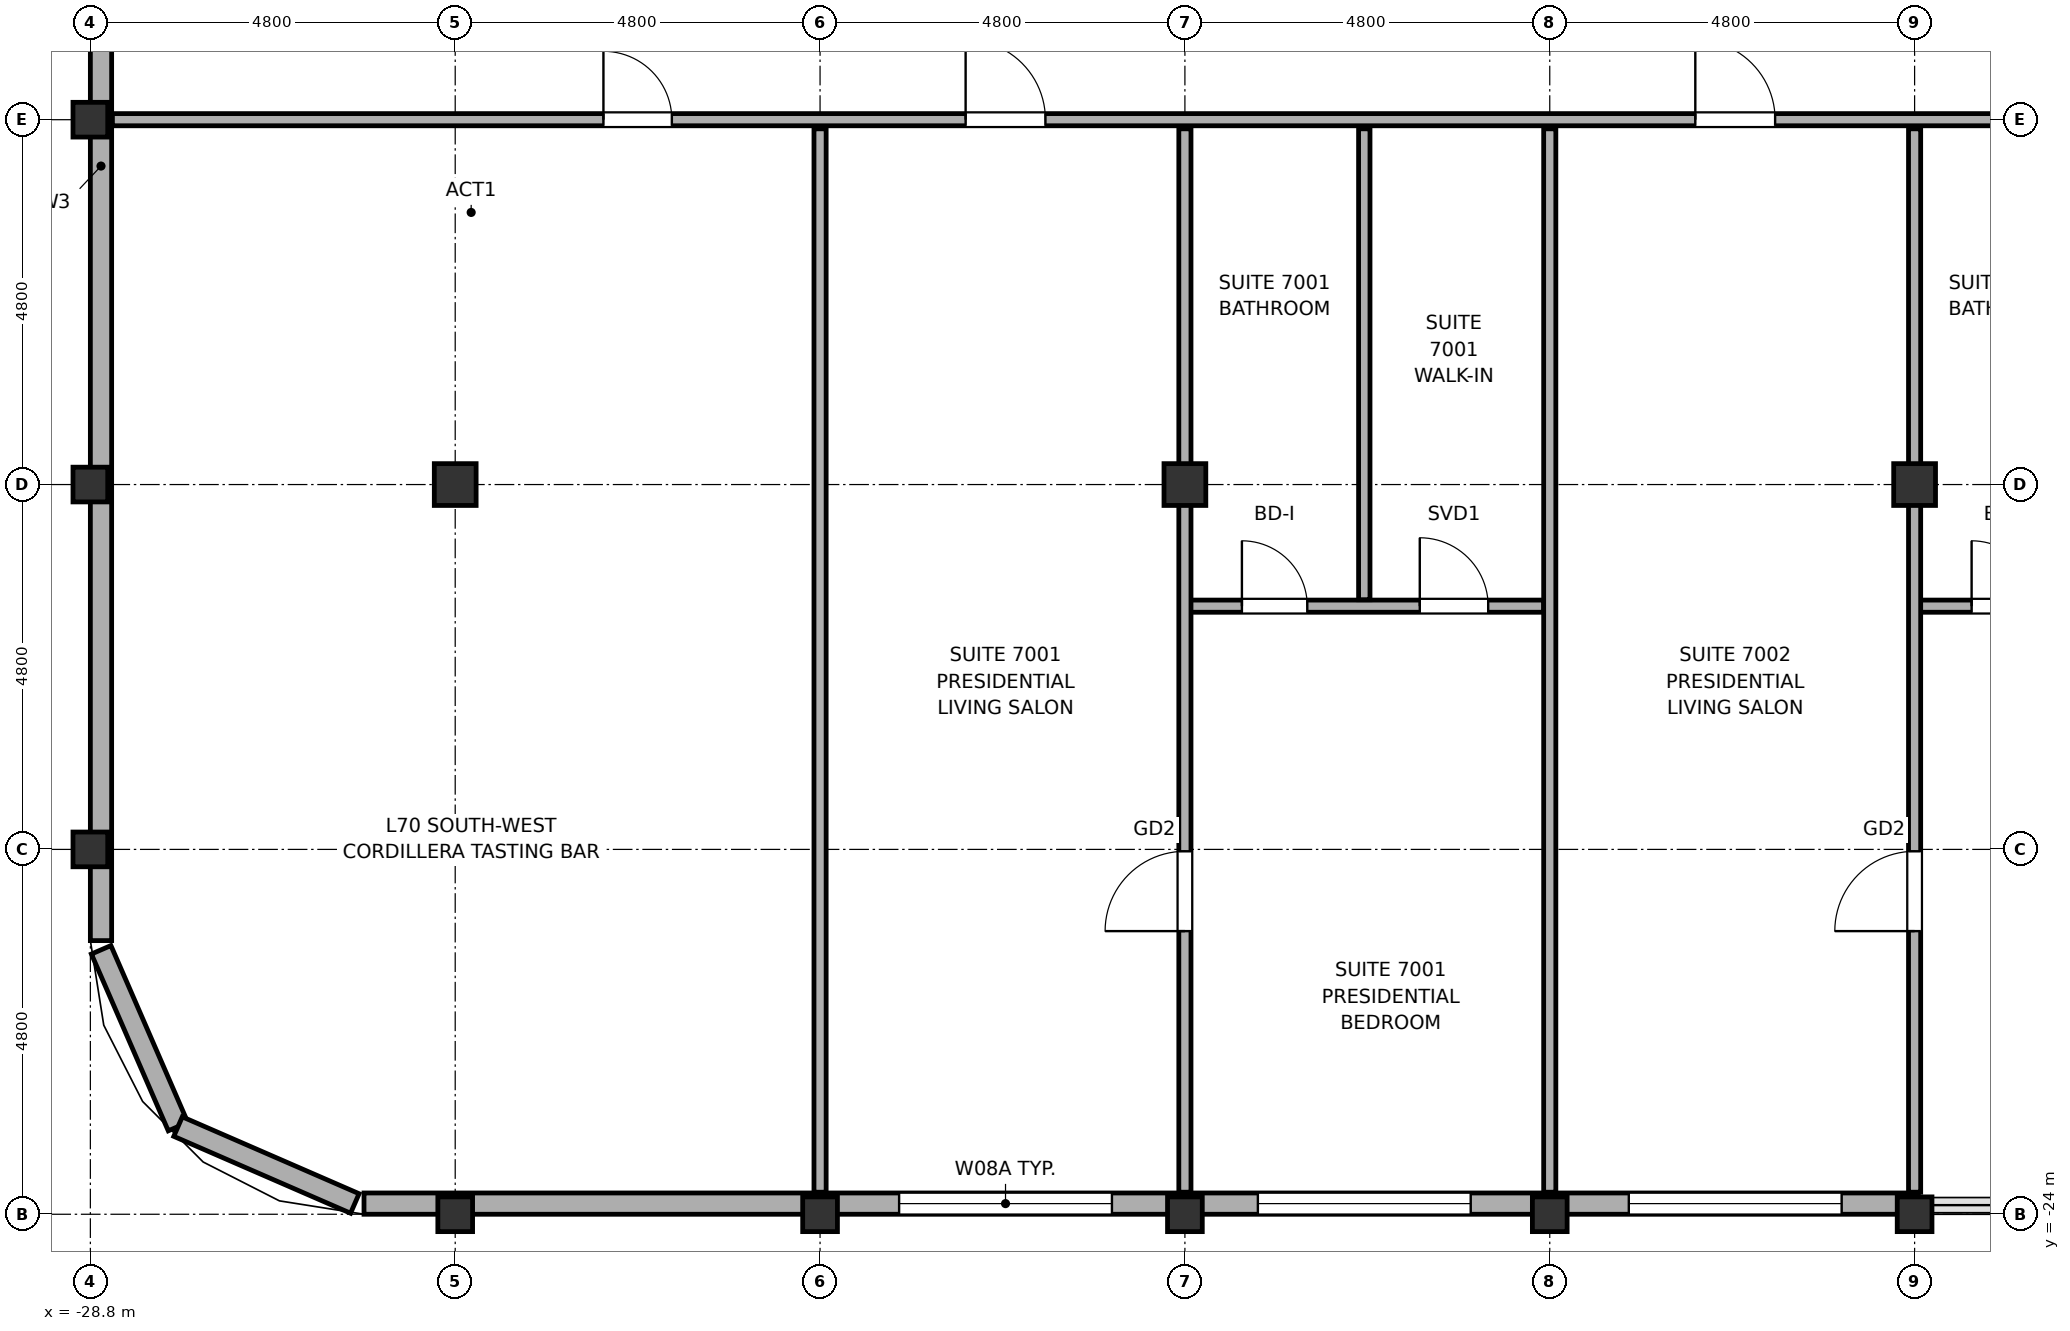
"""IFC4 building model, lengths in metres.
Left out: names, types, materials, properties, quantities, classifications, styles, units other than length and angle.
Written with IfcOpenShell. Run it as: python <this file> out.ifc"""

import sys

from ifc_helpers import new_model, si_unit, direction, frame, frame_2d, origin, origin_2d, place, context, subcontext, project, spatial, rectangle, hollow_rectangle, hollow_circle, extrude, element, fill, save


model = new_model("IFC4")
c1 = context("Model", 3, precision=1e-05, world=origin(), true_north=direction((0.0, 1.0)))
c2 = subcontext(c1, "Body", "Model", "MODEL_VIEW")
j1 = project(units=[si_unit("LENGTHUNIT", "METRE"), si_unit("PLANEANGLEUNIT", "RADIAN")], contexts=[c1])
p1 = place(None, origin())
s1 = spatial("IfcSite", under=j1, at=p1, CompositionType="ELEMENT")
p2 = place(p1, origin())
s2 = spatial("IfcBuilding", under=s1, at=p2, CompositionType="ELEMENT")
p3 = place(p2, frame((0.0, 0.0, 282.2)))
s3 = spatial("IfcBuildingStorey", under=s2, at=p3, CompositionType="ELEMENT", Elevation=282.2)
for number, where, z_axis, x_axis in (
    (1, (-28.8, -19.2, 0.0), (0.0, 0.0, 1.0), (1.0, 0.0, 0.0)),
    (2, (-28.8, -14.4, 0.0), (0.0, 0.0, 1.0), (1.0, 0.0, 0.0)),
    (3, (-28.8, -9.6, 0.0), (0.0, 0.0, 1.0), (1.0, 0.0, 0.0)),
):
    element("IfcColumn", number, at=place(p3, frame(where, z_axis=z_axis, x_axis=x_axis)), inside=s3, PredefinedType="COLUMN", context=c2, shape_type="SweptSolid", body=[
        extrude(hollow_circle(Radius=0.229, WallThickness=0.02, at=origin_2d()), origin(), (0.0, 0.0, 1.0), 4.2),
    ])
p4 = place(p3, frame((-24.0, -24.0, -0.2), z_axis=(0.0, 0.0, 1.0), x_axis=(1.0, 0.0, 0.0)))
e4 = element("IfcColumn", 4, at=p4, inside=s3, PredefinedType="COLUMN", context=c2, shape_type="SweptSolid", body=[
    extrude(hollow_circle(Radius=0.229, WallThickness=0.02, at=origin_2d()), origin(), (0.0, 0.0, 1.0), 4.4),
])
p5 = place(p3, frame((-24.0, -14.4, 0.0), z_axis=(0.0, 0.0, 1.0), x_axis=(1.0, 0.0, 0.0)))
e5 = element("IfcColumn", 5, at=p5, inside=s3, PredefinedType="COLUMN", context=c2, shape_type="SweptSolid", body=[
    extrude(hollow_rectangle(XDim=0.55, YDim=0.55, WallThickness=0.025, at=origin_2d()), origin(), (0.0, 0.0, 1.0), 4.2),
])
for number, where, z_axis, x_axis in (
    (6, (-19.2, -24.0, -0.2), (0.0, 0.0, 1.0), (1.0, 0.0, 0.0)),
    (7, (-14.4, -24.0, -0.2), (0.0, 0.0, 1.0), (1.0, 0.0, 0.0)),
):
    element("IfcColumn", number, at=place(p3, frame(where, z_axis=z_axis, x_axis=x_axis)), inside=s3, PredefinedType="COLUMN", context=c2, shape_type="SweptSolid", body=[
        extrude(hollow_circle(Radius=0.229, WallThickness=0.02, at=origin_2d()), origin(), (0.0, 0.0, 1.0), 4.4),
    ])
p6 = place(p3, frame((-14.4, -14.4, 0.0), z_axis=(0.0, 0.0, 1.0), x_axis=(1.0, 0.0, 0.0)))
e8 = element("IfcColumn", 8, at=p6, inside=s3, PredefinedType="COLUMN", context=c2, shape_type="SweptSolid", body=[
    extrude(hollow_rectangle(XDim=0.55, YDim=0.55, WallThickness=0.025, at=origin_2d()), origin(), (0.0, 0.0, 1.0), 4.2),
])
for number, where, z_axis, x_axis in (
    (9, (-9.6, -24.0, -0.2), (0.0, 0.0, 1.0), (1.0, 0.0, 0.0)),
    (10, (-4.8, -24.0, -0.2), (0.0, 0.0, 1.0), (1.0, 0.0, 0.0)),
):
    element("IfcColumn", number, at=place(p3, frame(where, z_axis=z_axis, x_axis=x_axis)), inside=s3, PredefinedType="COLUMN", context=c2, shape_type="SweptSolid", body=[
        extrude(hollow_circle(Radius=0.229, WallThickness=0.02, at=origin_2d()), origin(), (0.0, 0.0, 1.0), 4.4),
    ])
p7 = place(p3, frame((-4.8, -14.4, 0.0), z_axis=(0.0, 0.0, 1.0), x_axis=(1.0, 0.0, 0.0)))
e11 = element("IfcColumn", 11, at=p7, inside=s3, PredefinedType="COLUMN", context=c2, shape_type="SweptSolid", body=[
    extrude(hollow_rectangle(XDim=0.55, YDim=0.55, WallThickness=0.025, at=origin_2d()), origin(), (0.0, 0.0, 1.0), 4.2),
])
p8 = place(p3, frame((-28.658, -20.521, 0.0), z_axis=(0.0, 0.0, 1.0), x_axis=(0.398792985289, -0.917040977756, 0.0)))
e12 = element("IfcWall", 12, at=p8, inside=s3, PredefinedType="SOLIDWALL", context=c2, shape_type="SweptSolid", body=[
    extrude(rectangle(XDim=2.536, YDim=0.28, at=frame_2d((1.268, 0.0))), origin(), (0.0, 0.0, 1.0), 2.6),
])
p9 = place(p3, frame((-27.646, -22.847, 0.0), z_axis=(0.0, 0.0, 1.0), x_axis=(0.917060872934, -0.398747232384, 0.0)))
e13 = element("IfcWall", 13, at=p9, inside=s3, PredefinedType="SOLIDWALL", context=c2, shape_type="SweptSolid", body=[
    extrude(rectangle(XDim=2.536, YDim=0.28, at=frame_2d((1.268, 0.0))), origin(), (0.0, 0.0, 1.0), 2.6),
])
p10 = place(p3, frame((-25.2, -23.86, 0.0), z_axis=(0.0, 0.0, 1.0), x_axis=(1.0, 0.0, 0.0)))
e14 = element("IfcWall", 14, at=p10, inside=s3, PredefinedType="SOLIDWALL", context=c2, shape_type="SweptSolid", body=[
    extrude(rectangle(XDim=20.45, YDim=0.28, at=frame_2d((10.225, 0.0))), origin(), (0.0, 0.0, 1.0), 2.6),
])
p11 = place(p10, frame((7.04, 0.0, 0.75)))
e15 = element("IfcOpeningElement", 15, at=p11, cuts=e14, PredefinedType="OPENING", context=c2, shape_type="SweptSolid", body=[
    extrude(rectangle(XDim=2.8, YDim=1.7, at=frame_2d((1.4, 0.85))), frame((0.0, 0.155, 0.0), z_axis=(0.0, -1.0, 0.0), x_axis=(1.0, 0.0, 0.0)), (0.0, 0.0, 1.0), 0.31),
])
p12 = place(p10, frame((11.76, 0.0, 0.75)))
e16 = element("IfcOpeningElement", 16, at=p12, cuts=e14, PredefinedType="OPENING", context=c2, shape_type="SweptSolid", body=[
    extrude(rectangle(XDim=2.8, YDim=1.7, at=frame_2d((1.4, 0.85))), frame((0.0, 0.155, 0.0), z_axis=(0.0, -1.0, 0.0), x_axis=(1.0, 0.0, 0.0)), (0.0, 0.0, 1.0), 0.31),
])
p13 = place(p10, frame((16.64, 0.0, 0.75)))
e17 = element("IfcOpeningElement", 17, at=p13, cuts=e14, PredefinedType="OPENING", context=c2, shape_type="SweptSolid", body=[
    extrude(rectangle(XDim=2.8, YDim=1.7, at=frame_2d((1.4, 0.85))), frame((0.0, 0.155, 0.0), z_axis=(0.0, -1.0, 0.0), x_axis=(1.0, 0.0, 0.0)), (0.0, 0.0, 1.0), 0.31),
])
p14 = place(p3, frame((-28.66, -20.4, 0.0), z_axis=(0.0, 0.0, 1.0), x_axis=(0.0, 1.0, 0.0)))
e18 = element("IfcWall", 18, at=p14, inside=s3, PredefinedType="SOLIDWALL", context=c2, shape_type="SweptSolid", body=[
    extrude(rectangle(XDim=20.38, YDim=0.28, at=frame_2d((10.19, 0.0))), origin(), (0.0, 0.0, 1.0), 2.6),
])
p15 = place(p3, frame((-14.4, -16.0, 0.0), z_axis=(0.0, 0.0, 1.0), x_axis=(1.0, 0.0, 0.0)))
e19 = element("IfcWall", 19, at=p15, inside=s3, PredefinedType="PARTITIONING", context=c2, shape_type="SweptSolid", body=[
    extrude(rectangle(XDim=4.72, YDim=0.16, at=frame_2d((2.36, 0.0))), origin(), (0.0, 0.0, 1.0), 3.56),
])
p16 = place(p15, frame((0.75, 0.0, 0.0)))
e20 = element("IfcOpeningElement", 20, at=p16, cuts=e19, PredefinedType="OPENING", context=c2, shape_type="SweptSolid", body=[
    extrude(rectangle(XDim=0.86, YDim=2.1, at=frame_2d((0.43, 1.05))), frame((0.0, 0.095, 0.0), z_axis=(0.0, -1.0, 0.0), x_axis=(1.0, 0.0, 0.0)), (0.0, 0.0, 1.0), 0.19),
])
p17 = place(p15, frame((3.09, 0.0, 0.0)))
e21 = element("IfcOpeningElement", 21, at=p17, cuts=e19, PredefinedType="OPENING", context=c2, shape_type="SweptSolid", body=[
    extrude(rectangle(XDim=0.9, YDim=2.1, at=frame_2d((0.45, 1.05))), frame((0.0, 0.095, 0.0), z_axis=(0.0, -1.0, 0.0), x_axis=(1.0, 0.0, 0.0)), (0.0, 0.0, 1.0), 0.19),
])
p18 = place(p3, frame((-4.8, -16.0, 0.0), z_axis=(0.0, 0.0, 1.0), x_axis=(1.0, 0.0, 0.0)))
e22 = element("IfcWall", 22, at=p18, inside=s3, PredefinedType="PARTITIONING", context=c2, shape_type="SweptSolid", body=[
    extrude(rectangle(XDim=4.72, YDim=0.16, at=frame_2d((2.36, 0.0))), origin(), (0.0, 0.0, 1.0), 3.56),
])
p19 = place(p18, frame((0.75, 0.0, 0.0)))
e23 = element("IfcOpeningElement", 23, at=p19, cuts=e22, PredefinedType="OPENING", context=c2, shape_type="SweptSolid", body=[
    extrude(rectangle(XDim=0.86, YDim=2.1, at=frame_2d((0.43, 1.05))), frame((0.0, 0.095, 0.0), z_axis=(0.0, -1.0, 0.0), x_axis=(1.0, 0.0, 0.0)), (0.0, 0.0, 1.0), 0.19),
])
p20 = place(p18, frame((3.09, 0.0, 0.0)))
e24 = element("IfcOpeningElement", 24, at=p20, cuts=e22, PredefinedType="OPENING", context=c2, shape_type="SweptSolid", body=[
    extrude(rectangle(XDim=0.9, YDim=2.1, at=frame_2d((0.45, 1.05))), frame((0.0, 0.095, 0.0), z_axis=(0.0, -1.0, 0.0), x_axis=(1.0, 0.0, 0.0)), (0.0, 0.0, 1.0), 0.19),
])
p21 = place(p3, frame((-28.51, -9.6, 0.0), z_axis=(0.0, 0.0, 1.0), x_axis=(1.0, 0.0, 0.0)))
e25 = element("IfcWall", 25, at=p21, inside=s3, PredefinedType="PARTITIONING", context=c2, shape_type="SweptSolid", body=[
    extrude(rectangle(XDim=52.22, YDim=0.16, at=frame_2d((26.11, 0.0))), origin(), (0.0, 0.0, 1.0), 3.56),
])
p22 = place(p21, frame((6.46, 0.0, 0.0)))
e26 = element("IfcOpeningElement", 26, at=p22, cuts=e25, PredefinedType="OPENING", context=c2, shape_type="SweptSolid", body=[
    extrude(rectangle(XDim=0.9, YDim=2.1, at=frame_2d((0.45, 1.05))), frame((0.0, 0.095, 0.0), z_axis=(0.0, -1.0, 0.0), x_axis=(1.0, 0.0, 0.0)), (0.0, 0.0, 1.0), 0.19),
])
p23 = place(p21, frame((44.86, 0.0, 0.0)))
e27 = element("IfcOpeningElement", 27, at=p23, cuts=e25, PredefinedType="OPENING", context=c2, shape_type="SweptSolid", body=[
    extrude(rectangle(XDim=0.9, YDim=2.1, at=frame_2d((0.45, 1.05))), frame((0.0, 0.095, 0.0), z_axis=(0.0, -1.0, 0.0), x_axis=(1.0, 0.0, 0.0)), (0.0, 0.0, 1.0), 0.19),
])
p24 = place(p21, frame((11.225, 0.0, 0.0)))
e28 = element("IfcOpeningElement", 28, at=p24, cuts=e25, PredefinedType="OPENING", context=c2, shape_type="SweptSolid", body=[
    extrude(rectangle(XDim=1.05, YDim=2.2, at=frame_2d((0.525, 1.1))), frame((0.0, 0.095, 0.0), z_axis=(0.0, -1.0, 0.0), x_axis=(1.0, 0.0, 0.0)), (0.0, 0.0, 1.0), 0.19),
])
p25 = place(p21, frame((20.825, 0.0, 0.0)))
e29 = element("IfcOpeningElement", 29, at=p25, cuts=e25, PredefinedType="OPENING", context=c2, shape_type="SweptSolid", body=[
    extrude(rectangle(XDim=1.05, YDim=2.2, at=frame_2d((0.525, 1.1))), frame((0.0, 0.095, 0.0), z_axis=(0.0, -1.0, 0.0), x_axis=(1.0, 0.0, 0.0)), (0.0, 0.0, 1.0), 0.19),
])
p26 = place(p21, frame((30.425, 0.0, 0.0)))
e30 = element("IfcOpeningElement", 30, at=p26, cuts=e25, PredefinedType="OPENING", context=c2, shape_type="SweptSolid", body=[
    extrude(rectangle(XDim=1.05, YDim=2.2, at=frame_2d((0.525, 1.1))), frame((0.0, 0.095, 0.0), z_axis=(0.0, -1.0, 0.0), x_axis=(1.0, 0.0, 0.0)), (0.0, 0.0, 1.0), 0.19),
])
p27 = place(p21, frame((41.115, 0.0, 0.0)))
e31 = element("IfcOpeningElement", 31, at=p27, cuts=e25, PredefinedType="OPENING", context=c2, shape_type="SweptSolid", body=[
    extrude(rectangle(XDim=0.92, YDim=2.15, at=frame_2d((0.46, 1.075))), frame((0.0, 0.095, 0.0), z_axis=(0.0, -1.0, 0.0), x_axis=(1.0, 0.0, 0.0)), (0.0, 0.0, 1.0), 0.19),
])
p28 = place(p3, frame((-19.2, -23.71, 0.0), z_axis=(0.0, 0.0, 1.0), x_axis=(0.0, 1.0, 0.0)))
e32 = element("IfcWall", 32, at=p28, inside=s3, PredefinedType="PARTITIONING", context=c2, shape_type="SweptSolid", body=[
    extrude(rectangle(XDim=13.99, YDim=0.16, at=frame_2d((6.995, 0.0))), origin(), (0.0, 0.0, 1.0), 2.6),
])
p29 = place(p3, frame((-14.4, -23.71, 0.0), z_axis=(0.0, 0.0, 1.0), x_axis=(0.0, 1.0, 0.0)))
e33 = element("IfcWall", 33, at=p29, inside=s3, PredefinedType="PARTITIONING", context=c2, shape_type="SweptSolid", body=[
    extrude(rectangle(XDim=13.99, YDim=0.16, at=frame_2d((6.995, 0.0))), origin(), (0.0, 0.0, 1.0), 2.6),
])
p30 = place(p29, frame((3.435, 0.0, 0.0)))
e34 = element("IfcOpeningElement", 34, at=p30, cuts=e33, PredefinedType="OPENING", context=c2, shape_type="SweptSolid", body=[
    extrude(rectangle(XDim=1.05, YDim=2.2, at=frame_2d((0.525, 1.1))), frame((0.0, 0.095, 0.0), z_axis=(0.0, -1.0, 0.0), x_axis=(1.0, 0.0, 0.0)), (0.0, 0.0, 1.0), 0.19),
])
p31 = place(p3, frame((-12.04, -15.915, 0.0), z_axis=(0.0, 0.0, 1.0), x_axis=(0.0, 1.0, 0.0)))
e35 = element("IfcWall", 35, at=p31, inside=s3, PredefinedType="PARTITIONING", context=c2, shape_type="SweptSolid", body=[
    extrude(rectangle(XDim=6.195, YDim=0.15, at=frame_2d((3.098, 0.0))), origin(), (0.0, 0.0, 1.0), 2.6),
])
p32 = place(p3, frame((-9.6, -23.71, 0.0), z_axis=(0.0, 0.0, 1.0), x_axis=(0.0, 1.0, 0.0)))
e36 = element("IfcWall", 36, at=p32, inside=s3, PredefinedType="PARTITIONING", context=c2, shape_type="SweptSolid", body=[
    extrude(rectangle(XDim=13.99, YDim=0.16, at=frame_2d((6.995, 0.0))), origin(), (0.0, 0.0, 1.0), 2.6),
])
p33 = place(p3, frame((-4.8, -23.71, 0.0), z_axis=(0.0, 0.0, 1.0), x_axis=(0.0, 1.0, 0.0)))
e37 = element("IfcWall", 37, at=p33, inside=s3, PredefinedType="PARTITIONING", context=c2, shape_type="SweptSolid", body=[
    extrude(rectangle(XDim=13.99, YDim=0.16, at=frame_2d((6.995, 0.0))), origin(), (0.0, 0.0, 1.0), 2.6),
])
p34 = place(p33, frame((3.435, 0.0, 0.0)))
e38 = element("IfcOpeningElement", 38, at=p34, cuts=e37, PredefinedType="OPENING", context=c2, shape_type="SweptSolid", body=[
    extrude(rectangle(XDim=1.05, YDim=2.2, at=frame_2d((0.525, 1.1))), frame((0.0, 0.095, 0.0), z_axis=(0.0, -1.0, 0.0), x_axis=(1.0, 0.0, 0.0)), (0.0, 0.0, 1.0), 0.19),
])
p35 = place(p11, origin())
e39 = element("IfcWindow", 39, at=p35, inside=s3, PartitioningType="SINGLE_PANEL", PredefinedType="WINDOW", context=c2, shape_type="SweptSolid", body=[
    extrude(rectangle(XDim=2.8, YDim=1.7, at=frame_2d((1.4, 0.85))), frame((0.0, 0.03, 0.0), z_axis=(0.0, -1.0, 0.0), x_axis=(1.0, 0.0, 0.0)), (0.0, 0.0, 1.0), 0.06),
])
fill(e15, e39)
p36 = place(p12, origin())
e40 = element("IfcWindow", 40, at=p36, inside=s3, PartitioningType="SINGLE_PANEL", PredefinedType="WINDOW", context=c2, shape_type="SweptSolid", body=[
    extrude(rectangle(XDim=2.8, YDim=1.7, at=frame_2d((1.4, 0.85))), frame((0.0, 0.03, 0.0), z_axis=(0.0, -1.0, 0.0), x_axis=(1.0, 0.0, 0.0)), (0.0, 0.0, 1.0), 0.06),
])
fill(e16, e40)
p37 = place(p13, origin())
e41 = element("IfcWindow", 41, at=p37, inside=s3, PartitioningType="SINGLE_PANEL", PredefinedType="WINDOW", context=c2, shape_type="SweptSolid", body=[
    extrude(rectangle(XDim=2.8, YDim=1.7, at=frame_2d((1.4, 0.85))), frame((0.0, 0.03, 0.0), z_axis=(0.0, -1.0, 0.0), x_axis=(1.0, 0.0, 0.0)), (0.0, 0.0, 1.0), 0.06),
])
fill(e17, e41)
p38 = place(p22, origin())
e42 = element("IfcDoor", 42, at=p38, inside=s3, OperationType="SINGLE_SWING_LEFT", PredefinedType="DOOR", context=c2, shape_type="SweptSolid", body=[
    extrude(rectangle(XDim=0.9, YDim=2.1, at=frame_2d((0.45, 1.05))), frame((0.0, 0.025, 0.0), z_axis=(0.0, -1.0, 0.0), x_axis=(1.0, 0.0, 0.0)), (0.0, 0.0, 1.0), 0.05),
])
fill(e26, e42)
p39 = place(p24, origin())
e43 = element("IfcDoor", 43, at=p39, inside=s3, OperationType="SINGLE_SWING_LEFT", PredefinedType="DOOR", context=c2, shape_type="SweptSolid", body=[
    extrude(rectangle(XDim=1.05, YDim=2.2, at=frame_2d((0.525, 1.1))), frame((0.0, 0.025, 0.0), z_axis=(0.0, -1.0, 0.0), x_axis=(1.0, 0.0, 0.0)), (0.0, 0.0, 1.0), 0.05),
])
fill(e28, e43)
p40 = place(p30, origin())
e44 = element("IfcDoor", 44, at=p40, inside=s3, OperationType="SINGLE_SWING_RIGHT", PredefinedType="DOOR", context=c2, shape_type="SweptSolid", body=[
    extrude(rectangle(XDim=1.05, YDim=2.2, at=frame_2d((0.525, 1.1))), frame((0.0, 0.025, 0.0), z_axis=(0.0, -1.0, 0.0), x_axis=(1.0, 0.0, 0.0)), (0.0, 0.0, 1.0), 0.05),
])
fill(e34, e44)
p41 = place(p16, origin())
e45 = element("IfcDoor", 45, at=p41, inside=s3, OperationType="SINGLE_SWING_RIGHT", PredefinedType="DOOR", context=c2, shape_type="SweptSolid", body=[
    extrude(rectangle(XDim=0.86, YDim=2.1, at=frame_2d((0.43, 1.05))), frame((0.0, 0.025, 0.0), z_axis=(0.0, -1.0, 0.0), x_axis=(1.0, 0.0, 0.0)), (0.0, 0.0, 1.0), 0.05),
])
fill(e20, e45)
p42 = place(p17, origin())
e46 = element("IfcDoor", 46, at=p42, inside=s3, OperationType="SINGLE_SWING_LEFT", PredefinedType="DOOR", context=c2, shape_type="SweptSolid", body=[
    extrude(rectangle(XDim=0.9, YDim=2.1, at=frame_2d((0.45, 1.05))), frame((0.0, 0.025, 0.0), z_axis=(0.0, -1.0, 0.0), x_axis=(1.0, 0.0, 0.0)), (0.0, 0.0, 1.0), 0.05),
])
fill(e21, e46)
p43 = place(p25, origin())
e47 = element("IfcDoor", 47, at=p43, inside=s3, OperationType="SINGLE_SWING_RIGHT", PredefinedType="DOOR", context=c2, shape_type="SweptSolid", body=[
    extrude(rectangle(XDim=1.05, YDim=2.2, at=frame_2d((0.525, 1.1))), frame((0.0, 0.025, 0.0), z_axis=(0.0, -1.0, 0.0), x_axis=(1.0, 0.0, 0.0)), (0.0, 0.0, 1.0), 0.05),
])
fill(e29, e47)
p44 = place(p34, origin())
e48 = element("IfcDoor", 48, at=p44, inside=s3, OperationType="SINGLE_SWING_RIGHT", PredefinedType="DOOR", context=c2, shape_type="SweptSolid", body=[
    extrude(rectangle(XDim=1.05, YDim=2.2, at=frame_2d((0.525, 1.1))), frame((0.0, 0.025, 0.0), z_axis=(0.0, -1.0, 0.0), x_axis=(1.0, 0.0, 0.0)), (0.0, 0.0, 1.0), 0.05),
])
fill(e38, e48)
p45 = place(p19, origin())
e49 = element("IfcDoor", 49, at=p45, inside=s3, OperationType="SINGLE_SWING_RIGHT", PredefinedType="DOOR", context=c2, shape_type="SweptSolid", body=[
    extrude(rectangle(XDim=0.86, YDim=2.1, at=frame_2d((0.43, 1.05))), frame((0.0, 0.025, 0.0), z_axis=(0.0, -1.0, 0.0), x_axis=(1.0, 0.0, 0.0)), (0.0, 0.0, 1.0), 0.05),
])
fill(e23, e49)
save(model, sys.argv[1])
